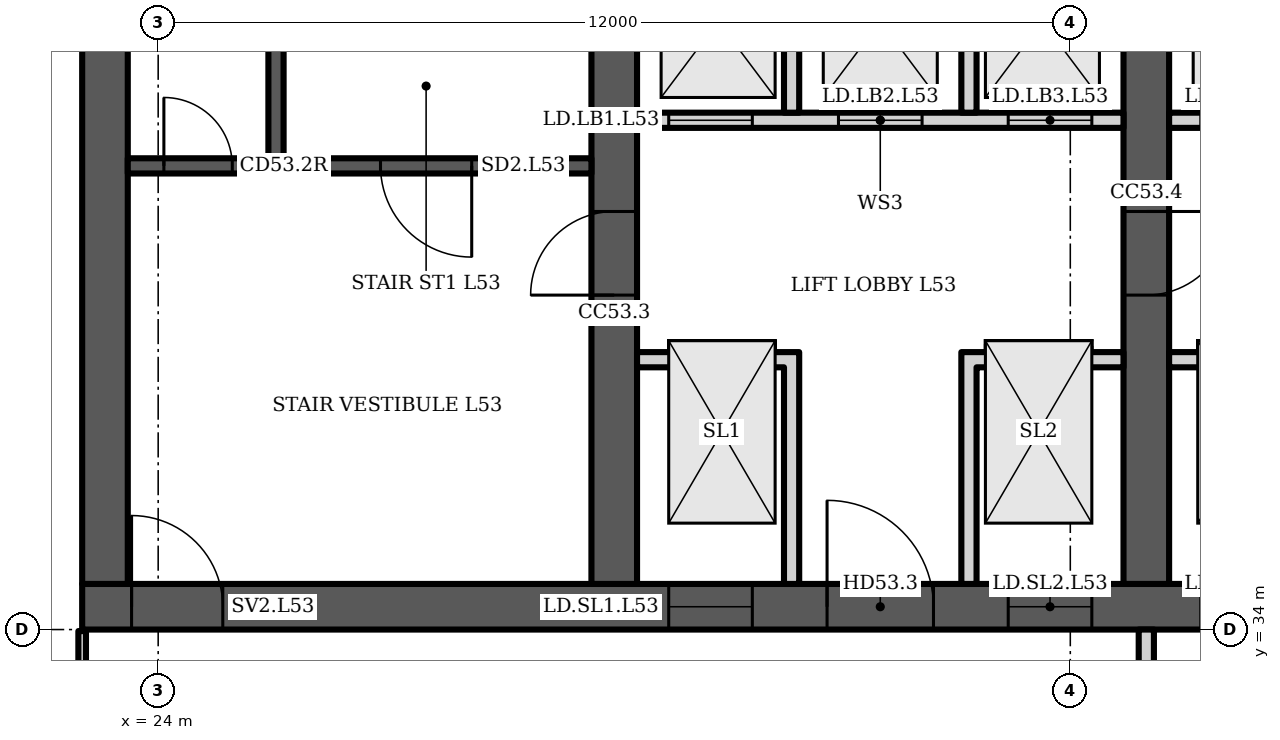
"""IFC4 building model, lengths in metres.
Left out: names, types, materials, properties, quantities, classifications, styles, units other than length and angle.
Written with IfcOpenShell. Run it as: python <this file> out.ifc"""

import sys

from ifc_helpers import new_model, si_unit, direction, frame, frame_2d, origin, place, context, subcontext, project, spatial, polyline, rectangle, outline, extrude, element, fill, save


model = new_model("IFC4")
c1 = context("Model", 3, precision=1e-05, world=origin(), true_north=direction((0.0, 1.0)))
c2 = subcontext(c1, "Body", "Model", "MODEL_VIEW")
j1 = project(units=[si_unit("LENGTHUNIT", "METRE"), si_unit("PLANEANGLEUNIT", "RADIAN")], contexts=[c1])
p1 = place(None, origin())
s1 = spatial("IfcSite", under=j1, at=p1, CompositionType="ELEMENT")
p2 = place(p1, origin())
s2 = spatial("IfcBuilding", under=s1, at=p2, CompositionType="ELEMENT")
p3 = place(p2, frame((0.0, 0.0, 214.3)))
s3 = spatial("IfcBuildingStorey", under=s2, at=p3, CompositionType="ELEMENT", Elevation=214.3)
p4 = place(p3, frame((23.0, 34.3, 0.0), z_axis=(0.0, 0.0, 1.0), x_axis=(1.0, 0.0, 0.0)))
e1 = element("IfcWall", 1, at=p4, inside=s3, PredefinedType="SHEAR", context=c2, shape_type="SweptSolid", body=[
    extrude(rectangle(XDim=35.0, YDim=0.6, at=frame_2d((17.5, 0.0))), origin(), (0.0, 0.0, 1.0), 3.6),
])
p5 = place(p4, frame((0.65, 0.0, 0.0)))
e2 = element("IfcOpeningElement", 2, at=p5, cuts=e1, PredefinedType="OPENING", context=c2, shape_type="SweptSolid", body=[
    extrude(rectangle(XDim=1.2, YDim=2.1, at=frame_2d((0.6, 1.05))), frame((0.0, 0.31, 0.0), z_axis=(0.0, -1.0, 0.0), x_axis=(1.0, 0.0, 0.0)), (0.0, 0.0, 1.0), 0.62),
])
p6 = place(p4, frame((7.717, 0.0, 0.0)))
e3 = element("IfcOpeningElement", 3, at=p6, cuts=e1, PredefinedType="OPENING", context=c2, shape_type="SweptSolid", body=[
    extrude(rectangle(XDim=1.1, YDim=2.1, at=frame_2d((0.55, 1.05))), frame((0.0, 0.31, 0.0), z_axis=(0.0, -1.0, 0.0), x_axis=(1.0, 0.0, 0.0)), (0.0, 0.0, 1.0), 0.62),
])
p7 = place(p4, frame((12.183, 0.0, 0.0)))
e4 = element("IfcOpeningElement", 4, at=p7, cuts=e1, PredefinedType="OPENING", context=c2, shape_type="SweptSolid", body=[
    extrude(rectangle(XDim=1.1, YDim=2.1, at=frame_2d((0.55, 1.05))), frame((0.0, 0.31, 0.0), z_axis=(0.0, -1.0, 0.0), x_axis=(1.0, 0.0, 0.0)), (0.0, 0.0, 1.0), 0.62),
])
p8 = place(p4, frame((9.8, 0.0, 0.0)))
e5 = element("IfcOpeningElement", 5, at=p8, cuts=e1, PredefinedType="OPENING", context=c2, shape_type="SweptSolid", body=[
    extrude(rectangle(XDim=1.4, YDim=2.1, at=frame_2d((0.7, 1.05))), frame((0.0, 0.31, 0.0), z_axis=(0.0, -1.0, 0.0), x_axis=(1.0, 0.0, 0.0)), (0.0, 0.0, 1.0), 0.62),
])
p9 = place(p4, frame((14.717, 0.0, 0.0)))
e6 = element("IfcOpeningElement", 6, at=p9, cuts=e1, PredefinedType="OPENING", context=c2, shape_type="SweptSolid", body=[
    extrude(rectangle(XDim=1.1, YDim=2.1, at=frame_2d((0.55, 1.05))), frame((0.0, 0.31, 0.0), z_axis=(0.0, -1.0, 0.0), x_axis=(1.0, 0.0, 0.0)), (0.0, 0.0, 1.0), 0.62),
])
p10 = place(p4, frame((16.95, 0.0, 0.0)))
e7 = element("IfcOpeningElement", 7, at=p10, cuts=e1, PredefinedType="OPENING", context=c2, shape_type="SweptSolid", body=[
    extrude(rectangle(XDim=1.1, YDim=2.1, at=frame_2d((0.55, 1.05))), frame((0.0, 0.31, 0.0), z_axis=(0.0, -1.0, 0.0), x_axis=(1.0, 0.0, 0.0)), (0.0, 0.0, 1.0), 0.62),
])
p11 = place(p4, frame((19.183, 0.0, 0.0)))
e8 = element("IfcOpeningElement", 8, at=p11, cuts=e1, PredefinedType="OPENING", context=c2, shape_type="SweptSolid", body=[
    extrude(rectangle(XDim=1.1, YDim=2.1, at=frame_2d((0.55, 1.05))), frame((0.0, 0.31, 0.0), z_axis=(0.0, -1.0, 0.0), x_axis=(1.0, 0.0, 0.0)), (0.0, 0.0, 1.0), 0.62),
])
p12 = place(p4, frame((26.15, 0.0, 0.0)))
e9 = element("IfcOpeningElement", 9, at=p12, cuts=e1, PredefinedType="OPENING", context=c2, shape_type="SweptSolid", body=[
    extrude(rectangle(XDim=1.2, YDim=2.1, at=frame_2d((0.6, 1.05))), frame((0.0, 0.31, 0.0), z_axis=(0.0, -1.0, 0.0), x_axis=(1.0, 0.0, 0.0)), (0.0, 0.0, 1.0), 0.62),
])
p13 = place(p4, frame((30.8, 0.0, 0.0)))
e10 = element("IfcOpeningElement", 10, at=p13, cuts=e1, PredefinedType="OPENING", context=c2, shape_type="SweptSolid", body=[
    extrude(rectangle(XDim=1.4, YDim=2.1, at=frame_2d((0.7, 1.05))), frame((0.0, 0.31, 0.0), z_axis=(0.0, -1.0, 0.0), x_axis=(1.0, 0.0, 0.0)), (0.0, 0.0, 1.0), 0.62),
])
p14 = place(p3, frame((23.3, 34.6, 0.0), z_axis=(0.0, 0.0, 1.0), x_axis=(0.0, 1.0, 0.0)))
e11 = element("IfcWall", 11, at=p14, inside=s3, PredefinedType="SHEAR", context=c2, shape_type="SweptSolid", body=[
    extrude(rectangle(XDim=13.585, YDim=0.6, at=frame_2d((6.792, 0.0))), origin(), (0.0, 0.0, 1.0), 3.6),
])
p15 = place(p3, frame((30.0, 34.6, 0.0), z_axis=(0.0, 0.0, 1.0), x_axis=(0.0, 1.0, 0.0)))
e12 = element("IfcWall", 12, at=p15, inside=s3, PredefinedType="SHEAR", context=c2, shape_type="SweptSolid", body=[
    extrude(rectangle(XDim=14.171, YDim=0.6, at=frame_2d((7.085, 0.0))), origin(), (0.0, 0.0, 1.0), 3.6),
])
p16 = place(p15, frame((3.8, 0.0, 0.0)))
e13 = element("IfcOpeningElement", 13, at=p16, cuts=e12, PredefinedType="OPENING", context=c2, shape_type="SweptSolid", body=[
    extrude(rectangle(XDim=1.1, YDim=2.1, at=frame_2d((0.55, 1.05))), frame((0.0, 0.31, 0.0), z_axis=(0.0, -1.0, 0.0), x_axis=(1.0, 0.0, 0.0)), (0.0, 0.0, 1.0), 0.62),
])
p17 = place(p3, frame((37.0, 34.6, 0.0), z_axis=(0.0, 0.0, 1.0), x_axis=(0.0, 1.0, 0.0)))
e14 = element("IfcWall", 14, at=p17, inside=s3, PredefinedType="SHEAR", context=c2, shape_type="SweptSolid", body=[
    extrude(rectangle(XDim=14.784, YDim=0.6, at=frame_2d((7.392, 0.0))), origin(), (0.0, 0.0, 1.0), 3.6),
])
p18 = place(p17, frame((11.302, 0.0, 0.0)))
e15 = element("IfcOpeningElement", 15, at=p18, cuts=e14, PredefinedType="OPENING", context=c2, shape_type="SweptSolid", body=[
    extrude(rectangle(XDim=1.0, YDim=2.1, at=frame_2d((0.5, 1.05))), frame((0.0, 0.31, 0.0), z_axis=(0.0, -1.0, 0.0), x_axis=(1.0, 0.0, 0.0)), (0.0, 0.0, 1.0), 0.62),
])
p19 = place(p17, frame((3.8, 0.0, 0.0)))
e16 = element("IfcOpeningElement", 16, at=p19, cuts=e14, PredefinedType="OPENING", context=c2, shape_type="SweptSolid", body=[
    extrude(rectangle(XDim=1.1, YDim=2.1, at=frame_2d((0.55, 1.05))), frame((0.0, 0.31, 0.0), z_axis=(0.0, -1.0, 0.0), x_axis=(1.0, 0.0, 0.0)), (0.0, 0.0, 1.0), 0.62),
])
p20 = place(p3, frame((23.6, 40.1, 0.0), z_axis=(0.0, 0.0, 1.0), x_axis=(1.0, 0.0, 0.0)))
e17 = element("IfcWall", 17, at=p20, inside=s3, PredefinedType="SHEAR", context=c2, shape_type="SweptSolid", body=[
    extrude(rectangle(XDim=6.1, YDim=0.2, at=frame_2d((3.05, 0.0))), origin(), (0.0, 0.0, 1.0), 3.2),
])
p21 = place(p20, frame((3.325, 0.0, 0.0)))
e18 = element("IfcOpeningElement", 18, at=p21, cuts=e17, PredefinedType="OPENING", context=c2, shape_type="SweptSolid", body=[
    extrude(rectangle(XDim=1.2, YDim=2.1, at=frame_2d((0.6, 1.05))), frame((0.0, 0.11, 0.0), z_axis=(0.0, -1.0, 0.0), x_axis=(1.0, 0.0, 0.0)), (0.0, 0.0, 1.0), 0.22),
])
p22 = place(p20, frame((0.475, 0.0, 0.0)))
e19 = element("IfcOpeningElement", 19, at=p22, cuts=e17, PredefinedType="OPENING", context=c2, shape_type="SweptSolid", body=[
    extrude(rectangle(XDim=0.9, YDim=2.1, at=frame_2d((0.45, 1.05))), frame((0.0, 0.11, 0.0), z_axis=(0.0, -1.0, 0.0), x_axis=(1.0, 0.0, 0.0)), (0.0, 0.0, 1.0), 0.22),
])
p23 = place(p3, frame((25.55, 40.2, 0.0), z_axis=(0.0, 0.0, 1.0), x_axis=(0.0, 1.0, 0.0)))
e20 = element("IfcWall", 20, at=p23, inside=s3, PredefinedType="SHEAR", context=c2, shape_type="SweptSolid", body=[
    extrude(rectangle(XDim=7.2, YDim=0.2, at=frame_2d((3.6, 0.0))), origin(), (0.0, 0.0, 1.0), 3.2),
])
p24 = place(p3, frame((30.3, 40.7, 0.0), z_axis=(0.0, 0.0, 1.0), x_axis=(1.0, 0.0, 0.0)))
e21 = element("IfcWall", 21, at=p24, inside=s3, PredefinedType="PARTITIONING", context=c2, shape_type="SweptSolid", body=[
    extrude(rectangle(XDim=6.4, YDim=0.2, at=frame_2d((3.2, 0.0))), origin(), (0.0, 0.0, 1.0), 3.2),
])
p25 = place(p24, frame((0.417, 0.0, 0.0)))
e22 = element("IfcOpeningElement", 22, at=p25, cuts=e21, PredefinedType="OPENING", context=c2, shape_type="SweptSolid", body=[
    extrude(rectangle(XDim=1.1, YDim=2.1, at=frame_2d((0.55, 1.05))), frame((0.0, 0.11, 0.0), z_axis=(0.0, -1.0, 0.0), x_axis=(1.0, 0.0, 0.0)), (0.0, 0.0, 1.0), 0.22),
])
p26 = place(p24, frame((2.65, 0.0, 0.0)))
e23 = element("IfcOpeningElement", 23, at=p26, cuts=e21, PredefinedType="OPENING", context=c2, shape_type="SweptSolid", body=[
    extrude(rectangle(XDim=1.1, YDim=2.1, at=frame_2d((0.55, 1.05))), frame((0.0, 0.11, 0.0), z_axis=(0.0, -1.0, 0.0), x_axis=(1.0, 0.0, 0.0)), (0.0, 0.0, 1.0), 0.22),
])
p27 = place(p24, frame((4.883, 0.0, 0.0)))
e24 = element("IfcOpeningElement", 24, at=p27, cuts=e21, PredefinedType="OPENING", context=c2, shape_type="SweptSolid", body=[
    extrude(rectangle(XDim=1.1, YDim=2.1, at=frame_2d((0.55, 1.05))), frame((0.0, 0.11, 0.0), z_axis=(0.0, -1.0, 0.0), x_axis=(1.0, 0.0, 0.0)), (0.0, 0.0, 1.0), 0.22),
])
p28 = place(p3, frame((0.0, 0.0, -0.0)))
e25 = element("IfcWall", 25, at=p28, inside=s3, PredefinedType="PARTITIONING", context=c2, shape_type="SweptSolid", body=[
    extrude(outline(polyline([(32.233, 37.45), (30.3, 37.45), (30.3, 37.65), (32.233, 37.65), (32.433, 37.65), (32.433, 34.6), (32.233, 34.6), (32.233, 37.45)])), origin(), (0.0, 0.0, 1.0), 3.2),
])
p29 = place(p3, frame((0.0, 0.0, -0.0)))
e26 = element("IfcWall", 26, at=p29, inside=s3, PredefinedType="PARTITIONING", context=c2, shape_type="SweptSolid", body=[
    extrude(outline(polyline([(34.567, 37.65), (34.767, 37.65), (36.7, 37.65), (36.7, 37.45), (34.767, 37.45), (34.767, 34.6), (34.567, 34.6), (34.567, 37.65)])), origin(), (0.0, 0.0, 1.0), 3.2),
])
p30 = place(p3, frame((0.0, 0.0, -0.0)))
e27 = element("IfcWall", 27, at=p30, inside=s3, PredefinedType="PARTITIONING", context=c2, shape_type="SweptSolid", body=[
    extrude(outline(polyline([(32.433, 40.8), (32.233, 40.8), (32.233, 43.8), (30.3, 43.8), (30.3, 44.0), (36.7, 44.0), (36.7, 43.8), (34.767, 43.8), (34.767, 40.8), (34.567, 40.8), (34.567, 43.8), (32.433, 43.8), (32.433, 40.8)])), origin(), (0.0, 0.0, 1.0), 3.2),
])
p31 = place(p3, frame((37.3, 40.7, 0.0), z_axis=(0.0, 0.0, 1.0), x_axis=(1.0, 0.0, 0.0)))
e28 = element("IfcWall", 28, at=p31, inside=s3, PredefinedType="PARTITIONING", context=c2, shape_type="SweptSolid", body=[
    extrude(rectangle(XDim=6.4, YDim=0.2, at=frame_2d((3.2, 0.0))), origin(), (0.0, 0.0, 1.0), 3.2),
])
p32 = place(p31, frame((0.417, 0.0, 0.0)))
e29 = element("IfcOpeningElement", 29, at=p32, cuts=e28, PredefinedType="OPENING", context=c2, shape_type="SweptSolid", body=[
    extrude(rectangle(XDim=1.1, YDim=2.1, at=frame_2d((0.55, 1.05))), frame((0.0, 0.11, 0.0), z_axis=(0.0, -1.0, 0.0), x_axis=(1.0, 0.0, 0.0)), (0.0, 0.0, 1.0), 0.22),
])
p33 = place(p31, frame((2.65, 0.0, 0.0)))
e30 = element("IfcOpeningElement", 30, at=p33, cuts=e28, PredefinedType="OPENING", context=c2, shape_type="SweptSolid", body=[
    extrude(rectangle(XDim=1.1, YDim=2.1, at=frame_2d((0.55, 1.05))), frame((0.0, 0.11, 0.0), z_axis=(0.0, -1.0, 0.0), x_axis=(1.0, 0.0, 0.0)), (0.0, 0.0, 1.0), 0.22),
])
p34 = place(p31, frame((4.883, 0.0, 0.0)))
e31 = element("IfcOpeningElement", 31, at=p34, cuts=e28, PredefinedType="OPENING", context=c2, shape_type="SweptSolid", body=[
    extrude(rectangle(XDim=1.1, YDim=2.1, at=frame_2d((0.55, 1.05))), frame((0.0, 0.11, 0.0), z_axis=(0.0, -1.0, 0.0), x_axis=(1.0, 0.0, 0.0)), (0.0, 0.0, 1.0), 0.22),
])
p35 = place(p3, frame((0.0, 0.0, -0.0)))
e32 = element("IfcWall", 32, at=p35, inside=s3, PredefinedType="PARTITIONING", context=c2, shape_type="SweptSolid", body=[
    extrude(outline(polyline([(41.567, 37.1), (39.433, 37.1), (39.433, 34.6), (39.233, 34.6), (39.233, 37.45), (37.3, 37.45), (37.3, 37.65), (39.233, 37.65), (39.433, 37.65), (39.433, 37.3), (41.567, 37.3), (41.567, 37.35), (41.767, 37.35), (43.7, 37.35), (43.7, 37.15), (41.767, 37.15), (41.767, 34.6), (41.567, 34.6), (41.567, 37.1)])), origin(), (0.0, 0.0, 1.0), 3.2),
])
p36 = place(p3, frame((0.0, 0.0, -0.0)))
e33 = element("IfcWall", 33, at=p36, inside=s3, PredefinedType="PARTITIONING", context=c2, shape_type="SweptSolid", body=[
    extrude(outline(polyline([(39.433, 40.8), (39.233, 40.8), (39.233, 43.8), (37.3, 43.8), (37.3, 44.0), (43.7, 44.0), (43.7, 43.8), (41.767, 43.8), (41.767, 40.8), (41.567, 40.8), (41.567, 43.8), (39.433, 43.8), (39.433, 40.8)])), origin(), (0.0, 0.0, 1.0), 3.2),
])
p37 = place(p3, frame((37.0, 30.5, 0.0), z_axis=(0.0, 0.0, 1.0), x_axis=(0.0, 1.0, 0.0)))
e34 = element("IfcWall", 34, at=p37, inside=s3, PredefinedType="PARTITIONING", context=c2, shape_type="SweptSolid", body=[
    extrude(rectangle(XDim=3.5, YDim=0.2, at=frame_2d((1.75, 0.0))), origin(), (0.0, 0.0, 1.0), 3.2),
])
p38 = place(p37, frame((1.2, 0.0, 0.0)))
e35 = element("IfcOpeningElement", 35, at=p38, cuts=e34, PredefinedType="OPENING", context=c2, shape_type="SweptSolid", body=[
    extrude(rectangle(XDim=1.1, YDim=2.1, at=frame_2d((0.55, 1.05))), frame((0.0, 0.11, 0.0), z_axis=(0.0, -1.0, 0.0), x_axis=(1.0, 0.0, 0.0)), (0.0, 0.0, 1.0), 0.22),
])
p39 = place(p3, frame((23.0, 30.5, 0.0), z_axis=(0.0, 0.0, 1.0), x_axis=(0.0, 1.0, 0.0)))
e36 = element("IfcWall", 36, at=p39, inside=s3, PredefinedType="PARTITIONING", context=c2, shape_type="SweptSolid", body=[
    extrude(rectangle(XDim=3.48, YDim=0.1, at=frame_2d((1.74, 0.0))), origin(), (0.0, 0.0, 1.0), 3.2),
])
p40 = place(p39, frame((0.28, 0.0, 0.0)))
e37 = element("IfcOpeningElement", 37, at=p40, cuts=e36, PredefinedType="OPENING", context=c2, shape_type="SweptSolid", body=[
    extrude(rectangle(XDim=1.0, YDim=2.1, at=frame_2d((0.5, 1.05))), frame((0.0, 0.06, 0.0), z_axis=(0.0, -1.0, 0.0), x_axis=(1.0, 0.0, 0.0)), (0.0, 0.0, 1.0), 0.12),
])
p41 = place(p21, origin())
e38 = element("IfcDoor", 38, at=p41, inside=s3, OperationType="SINGLE_SWING_RIGHT", PredefinedType="DOOR", context=c2, shape_type="SweptSolid", body=[
    extrude(rectangle(XDim=1.2, YDim=2.1, at=frame_2d((0.6, 1.05))), frame((0.0, 0.025, 0.0), z_axis=(0.0, -1.0, 0.0), x_axis=(1.0, 0.0, 0.0)), (0.0, 0.0, 1.0), 0.05),
])
fill(e18, e38)
p42 = place(p22, origin())
e39 = element("IfcDoor", 39, at=p42, inside=s3, OperationType="SINGLE_SWING_LEFT", PredefinedType="DOOR", context=c2, shape_type="SweptSolid", body=[
    extrude(rectangle(XDim=0.9, YDim=2.1, at=frame_2d((0.45, 1.05))), frame((0.0, 0.025, 0.0), z_axis=(0.0, -1.0, 0.0), x_axis=(1.0, 0.0, 0.0)), (0.0, 0.0, 1.0), 0.05),
])
fill(e19, e39)
p43 = place(p5, origin())
e40 = element("IfcDoor", 40, at=p43, inside=s3, OperationType="SINGLE_SWING_LEFT", PredefinedType="DOOR", context=c2, shape_type="SweptSolid", body=[
    extrude(rectangle(XDim=1.2, YDim=2.1, at=frame_2d((0.6, 1.05))), frame((0.0, 0.025, 0.0), z_axis=(0.0, -1.0, 0.0), x_axis=(1.0, 0.0, 0.0)), (0.0, 0.0, 1.0), 0.05),
])
fill(e2, e40)
p44 = place(p6, origin())
e41 = element("IfcDoor", 41, at=p44, inside=s3, OperationType="DOUBLE_DOOR_SLIDING", PredefinedType="DOOR", context=c2, shape_type="SweptSolid", body=[
    extrude(rectangle(XDim=1.1, YDim=2.1, at=frame_2d((0.55, 1.05))), frame((0.0, 0.025, 0.0), z_axis=(0.0, -1.0, 0.0), x_axis=(1.0, 0.0, 0.0)), (0.0, 0.0, 1.0), 0.05),
])
fill(e3, e41)
p45 = place(p7, origin())
e42 = element("IfcDoor", 42, at=p45, inside=s3, OperationType="DOUBLE_DOOR_SLIDING", PredefinedType="DOOR", context=c2, shape_type="SweptSolid", body=[
    extrude(rectangle(XDim=1.1, YDim=2.1, at=frame_2d((0.55, 1.05))), frame((0.0, 0.025, 0.0), z_axis=(0.0, -1.0, 0.0), x_axis=(1.0, 0.0, 0.0)), (0.0, 0.0, 1.0), 0.05),
])
fill(e4, e42)
p46 = place(p8, origin())
e43 = element("IfcDoor", 43, at=p46, inside=s3, OperationType="DOUBLE_DOOR_SINGLE_SWING", PredefinedType="DOOR", context=c2, shape_type="SweptSolid", body=[
    extrude(rectangle(XDim=1.4, YDim=2.1, at=frame_2d((0.7, 1.05))), frame((0.0, 0.025, 0.0), z_axis=(0.0, -1.0, 0.0), x_axis=(1.0, 0.0, 0.0)), (0.0, 0.0, 1.0), 0.05),
])
fill(e5, e43)
p47 = place(p25, origin())
e44 = element("IfcDoor", 44, at=p47, inside=s3, OperationType="DOUBLE_DOOR_SLIDING", PredefinedType="DOOR", context=c2, shape_type="SweptSolid", body=[
    extrude(rectangle(XDim=1.1, YDim=2.1, at=frame_2d((0.55, 1.05))), frame((0.0, 0.025, 0.0), z_axis=(0.0, -1.0, 0.0), x_axis=(1.0, 0.0, 0.0)), (0.0, 0.0, 1.0), 0.05),
])
fill(e22, e44)
p48 = place(p26, origin())
e45 = element("IfcDoor", 45, at=p48, inside=s3, OperationType="DOUBLE_DOOR_SLIDING", PredefinedType="DOOR", context=c2, shape_type="SweptSolid", body=[
    extrude(rectangle(XDim=1.1, YDim=2.1, at=frame_2d((0.55, 1.05))), frame((0.0, 0.025, 0.0), z_axis=(0.0, -1.0, 0.0), x_axis=(1.0, 0.0, 0.0)), (0.0, 0.0, 1.0), 0.05),
])
fill(e23, e45)
p49 = place(p27, origin())
e46 = element("IfcDoor", 46, at=p49, inside=s3, OperationType="DOUBLE_DOOR_SLIDING", PredefinedType="DOOR", context=c2, shape_type="SweptSolid", body=[
    extrude(rectangle(XDim=1.1, YDim=2.1, at=frame_2d((0.55, 1.05))), frame((0.0, 0.025, 0.0), z_axis=(0.0, -1.0, 0.0), x_axis=(1.0, 0.0, 0.0)), (0.0, 0.0, 1.0), 0.05),
])
fill(e24, e46)
p50 = place(p16, origin())
e47 = element("IfcDoor", 47, at=p50, inside=s3, OperationType="SINGLE_SWING_LEFT", PredefinedType="DOOR", context=c2, shape_type="SweptSolid", body=[
    extrude(rectangle(XDim=1.1, YDim=2.1, at=frame_2d((0.55, 1.05))), frame((0.0, 0.025, 0.0), z_axis=(0.0, -1.0, 0.0), x_axis=(1.0, 0.0, 0.0)), (0.0, 0.0, 1.0), 0.05),
])
fill(e13, e47)
p51 = place(p19, origin())
e48 = element("IfcDoor", 48, at=p51, inside=s3, OperationType="SINGLE_SWING_RIGHT", PredefinedType="DOOR", context=c2, shape_type="SweptSolid", body=[
    extrude(rectangle(XDim=1.1, YDim=2.1, at=frame_2d((0.55, 1.05))), frame((0.0, 0.025, 0.0), z_axis=(0.0, -1.0, 0.0), x_axis=(1.0, 0.0, 0.0)), (0.0, 0.0, 1.0), 0.05),
])
fill(e16, e48)
save(model, sys.argv[1])
